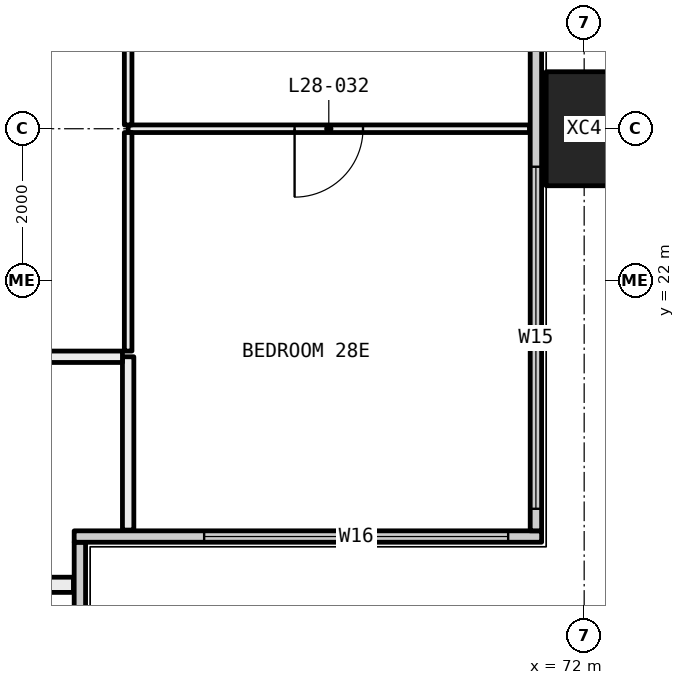
"""IFC4 building model, lengths in metres.
Left out: names, types, materials, properties, quantities, classifications, styles, units other than length and angle.
Written with IfcOpenShell. Run it as: python <this file> out.ifc"""

import sys

from ifc_helpers import new_model, si_unit, direction, frame, frame_2d, origin, origin_2d, place, context, subcontext, project, spatial, rectangle, hollow_rectangle, extrude, element, fill, save


model = new_model("IFC4")
c1 = context("Model", 3, precision=1e-05, world=origin(), true_north=direction((0.0, 1.0)))
c2 = subcontext(c1, "Body", "Model", "MODEL_VIEW")
j1 = project(units=[si_unit("LENGTHUNIT", "METRE"), si_unit("PLANEANGLEUNIT", "RADIAN")], contexts=[c1])
p1 = place(None, origin())
s1 = spatial("IfcSite", under=j1, at=p1, CompositionType="ELEMENT")
p2 = place(p1, origin())
s2 = spatial("IfcBuilding", under=s1, at=p2, CompositionType="ELEMENT")
p3 = place(p2, frame((0.0, 0.0, 110.4)))
s3 = spatial("IfcBuildingStorey", under=s2, at=p3, CompositionType="ELEMENT", Elevation=110.4)
p4 = place(p3, frame((72.0, 24.0, -0.4), z_axis=(0.0, 0.0, 1.0), x_axis=(0.0, 1.0, 0.0)))
e1 = element("IfcColumn", 1, at=p4, inside=s3, PredefinedType="COLUMN", context=c2, shape_type="SweptSolid", body=[
    extrude(hollow_rectangle(XDim=1.5, YDim=1.0, WallThickness=0.06, at=origin_2d()), origin(), (0.0, 0.0, 1.0), 3.45),
])
p5 = place(p3, frame((65.365, 12.71, 0.0), z_axis=(0.0, 0.0, 1.0), x_axis=(0.0, 1.0, 0.0)))
e2 = element("IfcWall", 2, at=p5, inside=s3, PredefinedType="ELEMENTEDWALL", context=c2, shape_type="SweptSolid", body=[
    extrude(rectangle(XDim=5.85, YDim=0.15, at=frame_2d((2.925, 0.0))), origin(), (0.0, 0.0, 1.0), 3.05),
])
p6 = place(p5, frame((0.29, 0.0, 0.45)))
e3 = element("IfcOpeningElement", 3, at=p6, cuts=e2, PredefinedType="OPENING", context=c2, shape_type="SweptSolid", body=[
    extrude(rectangle(XDim=4.0, YDim=2.55, at=frame_2d((2.0, 1.275))), frame((0.0, 0.085, 0.0), z_axis=(0.0, -1.0, 0.0), x_axis=(1.0, 0.0, 0.0)), (0.0, 0.0, 1.0), 0.17),
])
p7 = place(p3, frame((65.29, 18.635, 0.0), z_axis=(0.0, 0.0, 1.0), x_axis=(1.0, 0.0, 0.0)))
e4 = element("IfcWall", 4, at=p7, inside=s3, PredefinedType="ELEMENTEDWALL", context=c2, shape_type="SweptSolid", body=[
    extrude(rectangle(XDim=6.15, YDim=0.15, at=frame_2d((3.075, 0.0))), origin(), (0.0, 0.0, 1.0), 3.05),
])
p8 = place(p7, frame((1.71, 0.0, 0.45)))
e5 = element("IfcOpeningElement", 5, at=p8, cuts=e4, PredefinedType="OPENING", context=c2, shape_type="SweptSolid", body=[
    extrude(rectangle(XDim=4.0, YDim=2.55, at=frame_2d((2.0, 1.275))), frame((0.0, 0.085, 0.0), z_axis=(0.0, -1.0, 0.0), x_axis=(1.0, 0.0, 0.0)), (0.0, 0.0, 1.0), 0.17),
])
p9 = place(p3, frame((71.365, 18.71, 0.0), z_axis=(0.0, 0.0, 1.0), x_axis=(0.0, 1.0, 0.0)))
e6 = element("IfcWall", 6, at=p9, inside=s3, PredefinedType="ELEMENTEDWALL", context=c2, shape_type="SweptSolid", body=[
    extrude(rectangle(XDim=22.58, YDim=0.15, at=frame_2d((11.29, 0.0))), origin(), (0.0, 0.0, 1.0), 3.05),
])
p10 = place(p9, frame((0.29, 0.0, 0.45)))
e7 = element("IfcOpeningElement", 7, at=p10, cuts=e6, PredefinedType="OPENING", context=c2, shape_type="SweptSolid", body=[
    extrude(rectangle(XDim=4.5, YDim=2.55, at=frame_2d((2.25, 1.275))), frame((0.0, 0.085, 0.0), z_axis=(0.0, -1.0, 0.0), x_axis=(1.0, 0.0, 0.0)), (0.0, 0.0, 1.0), 0.17),
])
p11 = place(p9, frame((7.79, 0.0, 0.45)))
e8 = element("IfcOpeningElement", 8, at=p11, cuts=e6, PredefinedType="OPENING", context=c2, shape_type="SweptSolid", body=[
    extrude(rectangle(XDim=3.0, YDim=2.55, at=frame_2d((1.5, 1.275))), frame((0.0, 0.085, 0.0), z_axis=(0.0, -1.0, 0.0), x_axis=(1.0, 0.0, 0.0)), (0.0, 0.0, 1.0), 0.17),
])
p12 = place(p9, frame((11.79, 0.0, 0.45)))
e9 = element("IfcOpeningElement", 9, at=p12, cuts=e6, PredefinedType="OPENING", context=c2, shape_type="SweptSolid", body=[
    extrude(rectangle(XDim=2.0, YDim=2.55, at=frame_2d((1.0, 1.275))), frame((0.0, 0.085, 0.0), z_axis=(0.0, -1.0, 0.0), x_axis=(1.0, 0.0, 0.0)), (0.0, 0.0, 1.0), 0.17),
])
p13 = place(p9, frame((17.79, 0.0, 0.45)))
e10 = element("IfcOpeningElement", 10, at=p13, cuts=e6, PredefinedType="OPENING", context=c2, shape_type="SweptSolid", body=[
    extrude(rectangle(XDim=4.5, YDim=2.55, at=frame_2d((2.25, 1.275))), frame((0.0, 0.085, 0.0), z_axis=(0.0, -1.0, 0.0), x_axis=(1.0, 0.0, 0.0)), (0.0, 0.0, 1.0), 0.17),
])
p14 = place(p3, frame((65.28, 18.0, 0.0), z_axis=(0.0, 0.0, 1.0), x_axis=(-1.0, 0.0, 0.0)))
e11 = element("IfcWall", 11, at=p14, inside=s3, PredefinedType="PARTITIONING", context=c2, shape_type="SweptSolid", body=[
    extrude(rectangle(XDim=3.38, YDim=0.2, at=frame_2d((1.69, 0.0))), origin(), (0.0, 0.0, 1.0), 3.05),
])
p15 = place(p3, frame((71.28, 24.0, 0.0), z_axis=(0.0, 0.0, 1.0), x_axis=(-1.0, 0.0, 0.0)))
e12 = element("IfcWall", 12, at=p15, inside=s3, PredefinedType="PARTITIONING", context=c2, shape_type="SweptSolid", body=[
    extrude(rectangle(XDim=5.28, YDim=0.1, at=frame_2d((2.64, 0.0))), origin(), (0.0, 0.0, 1.0), 2.45),
])
p16 = place(p15, frame((2.19, 0.0, 0.0)))
e13 = element("IfcOpeningElement", 13, at=p16, cuts=e12, PredefinedType="OPENING", context=c2, shape_type="SweptSolid", body=[
    extrude(rectangle(XDim=0.9, YDim=2.1, at=frame_2d((0.45, 1.05))), frame((0.0, 0.06, 0.0), z_axis=(0.0, -1.0, 0.0), x_axis=(1.0, 0.0, 0.0)), (0.0, 0.0, 1.0), 0.12),
])
p17 = place(p3, frame((66.0, 21.0, 0.0), z_axis=(0.0, 0.0, 1.0), x_axis=(0.0, -1.0, 0.0)))
e14 = element("IfcWall", 14, at=p17, inside=s3, PredefinedType="PARTITIONING", context=c2, shape_type="SweptSolid", body=[
    extrude(rectangle(XDim=2.28, YDim=0.15, at=frame_2d((1.14, 0.0))), origin(), (0.0, 0.0, 1.0), 3.05),
])
p18 = place(p3, frame((66.0, 23.95, 0.0), z_axis=(0.0, 0.0, 1.0), x_axis=(0.0, -1.0, 0.0)))
e15 = element("IfcWall", 15, at=p18, inside=s3, PredefinedType="PARTITIONING", context=c2, shape_type="SweptSolid", body=[
    extrude(rectangle(XDim=2.875, YDim=0.1, at=frame_2d((1.438, 0.0))), origin(), (0.0, 0.0, 1.0), 2.45),
])
p19 = place(p3, frame((66.0, 29.95, 0.0), z_axis=(0.0, 0.0, 1.0), x_axis=(0.0, -1.0, 0.0)))
e16 = element("IfcWall", 16, at=p19, inside=s3, PredefinedType="PARTITIONING", context=c2, shape_type="SweptSolid", body=[
    extrude(rectangle(XDim=5.9, YDim=0.1, at=frame_2d((2.95, 0.0))), origin(), (0.0, 0.0, 1.0), 2.45),
])
p20 = place(p3, frame((65.925, 21.0, 0.0), z_axis=(0.0, 0.0, 1.0), x_axis=(-1.0, 0.0, 0.0)))
e17 = element("IfcWall", 17, at=p20, inside=s3, PredefinedType="PARTITIONING", context=c2, shape_type="SweptSolid", body=[
    extrude(rectangle(XDim=3.925, YDim=0.15, at=frame_2d((1.962, 0.0))), origin(), (0.0, 0.0, 1.0), 3.05),
])
p21 = place(p20, frame((1.512, 0.0, 0.0)))
e18 = element("IfcOpeningElement", 18, at=p21, cuts=e17, PredefinedType="OPENING", context=c2, shape_type="SweptSolid", body=[
    extrude(rectangle(XDim=0.9, YDim=2.1, at=frame_2d((0.45, 1.05))), frame((0.0, 0.085, 0.0), z_axis=(0.0, -1.0, 0.0), x_axis=(1.0, 0.0, 0.0)), (0.0, 0.0, 1.0), 0.17),
])
p22 = place(p8, origin())
e19 = element("IfcWindow", 19, at=p22, inside=s3, PartitioningType="SINGLE_PANEL", PredefinedType="WINDOW", context=c2, shape_type="SweptSolid", body=[
    extrude(rectangle(XDim=4.0, YDim=2.55, at=frame_2d((2.0, 1.275))), frame((0.0, 0.03, 0.0), z_axis=(0.0, -1.0, 0.0), x_axis=(1.0, 0.0, 0.0)), (0.0, 0.0, 1.0), 0.06),
])
fill(e5, e19)
p23 = place(p10, origin())
e20 = element("IfcWindow", 20, at=p23, inside=s3, PartitioningType="SINGLE_PANEL", PredefinedType="WINDOW", context=c2, shape_type="SweptSolid", body=[
    extrude(rectangle(XDim=4.5, YDim=2.55, at=frame_2d((2.25, 1.275))), frame((0.0, 0.03, 0.0), z_axis=(0.0, -1.0, 0.0), x_axis=(1.0, 0.0, 0.0)), (0.0, 0.0, 1.0), 0.06),
])
fill(e7, e20)
p24 = place(p16, origin())
e21 = element("IfcDoor", 21, at=p24, inside=s3, OperationType="SINGLE_SWING_LEFT", PredefinedType="DOOR", context=c2, shape_type="SweptSolid", body=[
    extrude(rectangle(XDim=0.9, YDim=2.1, at=frame_2d((0.45, 1.05))), frame((0.0, 0.025, 0.0), z_axis=(0.0, -1.0, 0.0), x_axis=(1.0, 0.0, 0.0)), (0.0, 0.0, 1.0), 0.05),
])
fill(e13, e21)
save(model, sys.argv[1])
